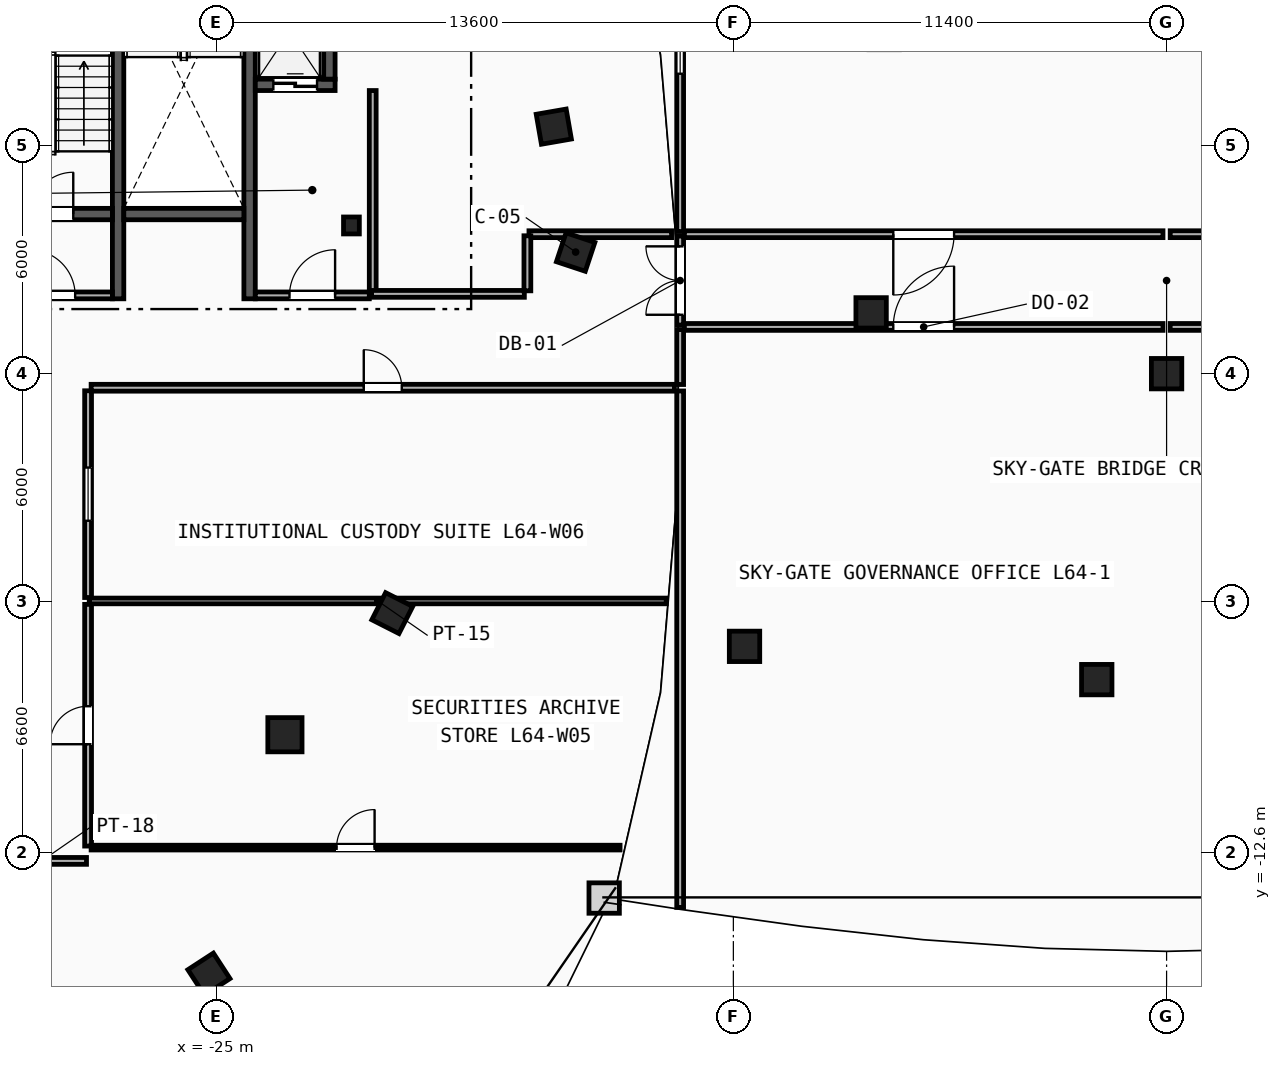
"""IFC4 building model, lengths in metres.
Left out: names, types, materials, properties, quantities, classifications, styles, units other than length and angle.
Written with IfcOpenShell. Run it as: python <this file> out.ifc"""

import sys

from ifc_helpers import new_model, si_unit, direction, frame, frame_2d, origin, origin_2d, place, context, subcontext, project, spatial, rectangle, i_section, extrude, element, fill, save


model = new_model("IFC4")
c1 = context("Model", 3, precision=1e-05, world=origin(), true_north=direction((0.0, 1.0)))
c2 = subcontext(c1, "Body", "Model", "MODEL_VIEW")
j1 = project(units=[si_unit("LENGTHUNIT", "METRE"), si_unit("PLANEANGLEUNIT", "RADIAN")], contexts=[c1])
p1 = place(None, origin())
s1 = spatial("IfcSite", under=j1, at=p1, CompositionType="ELEMENT")
p2 = place(p1, origin())
s2 = spatial("IfcBuilding", under=s1, at=p2, CompositionType="ELEMENT")
p3 = place(p2, frame((0.0, 0.0, 243.2)))
s3 = spatial("IfcBuildingStorey", under=s2, at=p3, CompositionType="ELEMENT", Elevation=243.2)
p4 = place(p3, frame((-21.45, 3.9, 0.0), z_axis=(0.0, 0.0, 1.0), x_axis=(1.0, 0.0, 0.0)))
e1 = element("IfcColumn", 1, at=p4, inside=s3, PredefinedType="COLUMN", context=c2, shape_type="SweptSolid", body=[
    extrude(i_section(OverallWidth=0.416, OverallDepth=0.446, WebThickness=0.039, FlangeThickness=0.063, FilletRadius=0.018, at=origin_2d()), origin(), (0.0, 0.0, 1.0), 3.6),
])
p5 = place(p3, frame((-23.2, -9.5, 0.0), z_axis=(0.0, 0.0, 1.0), x_axis=(1.0, 0.0, 0.0)))
e2 = element("IfcColumn", 2, at=p5, inside=s3, PredefinedType="COLUMN", context=c2, shape_type="SweptSolid", body=[
    extrude(rectangle(XDim=0.9, YDim=0.9, at=origin_2d()), origin(), (0.0, 0.0, 1.0), 3.6),
])
for number, where, z_axis, x_axis in (
    (3, (-15.55, 3.2, 0.0), (0.0, 0.0, 1.0), (0.315, 0.949, 0.0)),
    (4, (-16.125, 6.5, 0.0), (0.0, 0.0, 1.0), (-0.172, 0.985, 0.0)),
    (5, (-25.2, -15.8, 0.0), (0.0, 0.0, 1.0), (0.838, 0.546, 0.0)),
    (6, (-20.375, -6.3, 0.0), (0.0, 0.0, 1.0), (0.453, 0.892, 0.0)),
    (7, (-11.106, -7.175, 0.0), (0.0, 0.0, 1.0), (1.0, 0.0, 0.0)),
    (8, (-1.837, -8.05, 0.0), (0.0, 0.0, 1.0), (1.0, 0.0, 0.0)),
    (9, (-7.775, 1.6, 0.0), (0.0, 0.0, 1.0), (1.0, 0.0, 0.0)),
    (10, (0.0, 0.0, 0.0), (0.0, 0.0, 1.0), (1.0, 0.0, 0.0)),
):
    element("IfcColumn", number, at=place(p3, frame(where, z_axis=z_axis, x_axis=x_axis)), inside=s3, PredefinedType="COLUMN", context=c2, shape_type="SweptSolid", body=[
        extrude(rectangle(XDim=0.8, YDim=0.8, at=origin_2d()), origin(), (0.0, 0.0, 1.0), 3.6),
    ])
for number, where, z_axis, x_axis in (
    (11, (-27.59, 1.97, 0.0), (0.0, 0.0, 1.0), (0.0, 1.0, 0.0)),
    (12, (-24.13, 1.97, 0.0), (0.0, 0.0, 1.0), (0.0, 1.0, 0.0)),
):
    element("IfcWall", number, at=place(p3, frame(where, z_axis=z_axis, x_axis=x_axis)), inside=s3, PredefinedType="SHEAR", context=c2, shape_type="SweptSolid", body=[
        extrude(rectangle(XDim=10.68, YDim=0.3, at=frame_2d((5.34, 0.0))), origin(), (0.0, 0.0, 1.0), 3.34),
    ])
p6 = place(p3, frame((-30.9, 4.2, 0.0), z_axis=(0.0, 0.0, 1.0), x_axis=(1.0, 0.0, 0.0)))
e13 = element("IfcWall", 13, at=p6, inside=s3, PredefinedType="SHEAR", context=c2, shape_type="SweptSolid", body=[
    extrude(rectangle(XDim=3.16, YDim=0.3, at=frame_2d((1.58, 0.0))), origin(), (0.0, 0.0, 1.0), 3.34),
])
p7 = place(p6, frame((1.03, 0.0, 0.0)))
e14 = element("IfcOpeningElement", 14, at=p7, cuts=e13, PredefinedType="OPENING", context=c2, shape_type="SweptSolid", body=[
    extrude(rectangle(XDim=1.1, YDim=2.15, at=frame_2d((0.55, 1.075))), frame((0.0, 0.16, 0.0), z_axis=(0.0, -1.0, 0.0), x_axis=(1.0, 0.0, 0.0)), (0.0, 0.0, 1.0), 0.32),
])
p8 = place(p3, frame((-27.44, 4.2, 0.0), z_axis=(0.0, 0.0, 1.0), x_axis=(1.0, 0.0, 0.0)))
e15 = element("IfcWall", 15, at=p8, inside=s3, PredefinedType="SHEAR", context=c2, shape_type="SweptSolid", body=[
    extrude(rectangle(XDim=3.16, YDim=0.3, at=frame_2d((1.58, 0.0))), origin(), (0.0, 0.0, 1.0), 3.34),
])
p9 = place(p3, frame((-20.89, 2.15, 0.0), z_axis=(0.0, 0.0, 1.0), x_axis=(0.0, 1.0, 0.0)))
e16 = element("IfcWall", 16, at=p9, inside=s3, PredefinedType="PARTITIONING", context=c2, shape_type="SweptSolid", body=[
    extrude(rectangle(XDim=5.3, YDim=0.18, at=frame_2d((2.65, 0.0))), origin(), (0.0, 0.0, 1.0), 3.34),
])
p10 = place(p3, frame((-23.98, 2.06, 0.0), z_axis=(0.0, 0.0, 1.0), x_axis=(1.0, 0.0, 0.0)))
e17 = element("IfcWall", 17, at=p10, inside=s3, PredefinedType="PARTITIONING", context=c2, shape_type="SweptSolid", body=[
    extrude(rectangle(XDim=3.0, YDim=0.18, at=frame_2d((1.5, 0.0))), origin(), (0.0, 0.0, 1.0), 3.34),
])
p11 = place(p10, frame((0.9, 0.0, 0.0)))
e18 = element("IfcOpeningElement", 18, at=p11, cuts=e17, PredefinedType="OPENING", context=c2, shape_type="SweptSolid", body=[
    extrude(rectangle(XDim=1.2, YDim=2.15, at=frame_2d((0.6, 1.075))), frame((0.0, 0.1, 0.0), z_axis=(0.0, -1.0, 0.0), x_axis=(1.0, 0.0, 0.0)), (0.0, 0.0, 1.0), 0.2),
])
p12 = place(p3, frame((-30.9, 2.06, 0.0), z_axis=(0.0, 0.0, 1.0), x_axis=(1.0, 0.0, 0.0)))
e19 = element("IfcWall", 19, at=p12, inside=s3, PredefinedType="PARTITIONING", context=c2, shape_type="SweptSolid", body=[
    extrude(rectangle(XDim=3.16, YDim=0.18, at=frame_2d((1.58, 0.0))), origin(), (0.0, 0.0, 1.0), 3.34),
])
p13 = place(p12, frame((0.98, 0.0, 0.0)))
e20 = element("IfcOpeningElement", 20, at=p13, cuts=e19, PredefinedType="OPENING", context=c2, shape_type="SweptSolid", body=[
    extrude(rectangle(XDim=1.2, YDim=2.15, at=frame_2d((0.6, 1.075))), frame((0.0, 0.1, 0.0), z_axis=(0.0, -1.0, 0.0), x_axis=(1.0, 0.0, 0.0)), (0.0, 0.0, 1.0), 0.2),
])
p14 = place(p3, frame((-23.98, 7.6, 0.0), z_axis=(0.0, 0.0, 1.0), x_axis=(1.0, 0.0, 0.0)))
e21 = element("IfcWall", 21, at=p14, inside=s3, PredefinedType="SHEAR", context=c2, shape_type="SweptSolid", body=[
    extrude(rectangle(XDim=2.1, YDim=0.3, at=frame_2d((1.05, 0.0))), origin(), (0.0, 0.0, 1.0), 3.34),
])
p15 = place(p14, frame((0.475, 0.0, 0.0)))
e22 = element("IfcOpeningElement", 22, at=p15, cuts=e21, PredefinedType="OPENING", context=c2, shape_type="SweptSolid", body=[
    extrude(rectangle(XDim=1.15, YDim=2.2, at=frame_2d((0.575, 1.1))), frame((0.0, 0.16, 0.0), z_axis=(0.0, -1.0, 0.0), x_axis=(1.0, 0.0, 0.0)), (0.0, 0.0, 1.0), 0.32),
])
p16 = place(p3, frame((-22.03, 7.75, 0.0), z_axis=(0.0, 0.0, 1.0), x_axis=(0.0, 1.0, 0.0)))
e23 = element("IfcWall", 23, at=p16, inside=s3, PredefinedType="SHEAR", context=c2, shape_type="SweptSolid", body=[
    extrude(rectangle(XDim=2.5, YDim=0.3, at=frame_2d((1.25, 0.0))), origin(), (0.0, 0.0, 1.0), 3.34),
])
p17 = place(p3, frame((-28.35, -5.98, 0.0), z_axis=(0.0, 0.0, 1.0), x_axis=(1.0, 0.0, 0.0)))
e24 = element("IfcWall", 24, at=p17, inside=s3, PredefinedType="PARTITIONING", context=c2, shape_type="SweptSolid", body=[
    extrude(rectangle(XDim=15.185, YDim=0.15, at=frame_2d((7.593, 0.0))), origin(), (0.0, 0.0, 1.0), 3.34),
])
p18 = place(p3, frame((-30.779, -12.82, 0.0), z_axis=(0.0, 0.0, 1.0), x_axis=(1.0, 0.0, 0.0)))
e25 = element("IfcWall", 25, at=p18, inside=s3, PredefinedType="PARTITIONING", context=c2, shape_type="SweptSolid", body=[
    extrude(rectangle(XDim=2.357, YDim=0.18, at=frame_2d((1.179, 0.0))), origin(), (0.0, 0.0, 1.0), 3.34),
])
p19 = place(p3, frame((-28.38, -12.43, 0.0), z_axis=(0.0, 0.0, 1.0), x_axis=(0.0, 1.0, 0.0)))
e26 = element("IfcWall", 26, at=p19, inside=s3, PredefinedType="PARTITIONING", context=c2, shape_type="SweptSolid", body=[
    extrude(rectangle(XDim=6.36, YDim=0.18, at=frame_2d((3.18, 0.0))), origin(), (0.0, 0.0, 1.0), 3.34),
])
p20 = place(p19, frame((2.68, 0.0, 0.0)))
e27 = element("IfcOpeningElement", 27, at=p20, cuts=e26, PredefinedType="OPENING", context=c2, shape_type="SweptSolid", body=[
    extrude(rectangle(XDim=1.0, YDim=2.15, at=frame_2d((0.5, 1.075))), frame((0.0, 0.1, 0.0), z_axis=(0.0, -1.0, 0.0), x_axis=(1.0, 0.0, 0.0)), (0.0, 0.0, 1.0), 0.2),
])
p21 = place(p3, frame((-28.3, -0.37, 0.0), z_axis=(0.0, 0.0, 1.0), x_axis=(1.0, 0.0, 0.0)))
e28 = element("IfcWall", 28, at=p21, inside=s3, PredefinedType="PARTITIONING", context=c2, shape_type="SweptSolid", body=[
    extrude(rectangle(XDim=15.349, YDim=0.18, at=frame_2d((7.675, 0.0))), origin(), (0.0, 0.0, 1.0), 3.34),
])
p22 = place(p21, frame((7.175, 0.0, 0.0)))
e29 = element("IfcOpeningElement", 29, at=p22, cuts=e28, PredefinedType="OPENING", context=c2, shape_type="SweptSolid", body=[
    extrude(rectangle(XDim=1.0, YDim=2.15, at=frame_2d((0.5, 1.075))), frame((0.0, 0.1, 0.0), z_axis=(0.0, -1.0, 0.0), x_axis=(1.0, 0.0, 0.0)), (0.0, 0.0, 1.0), 0.2),
])
p23 = place(p3, frame((-28.38, -5.89, 0.0), z_axis=(0.0, 0.0, 1.0), x_axis=(0.0, 1.0, 0.0)))
e30 = element("IfcWall", 30, at=p23, inside=s3, PredefinedType="PARTITIONING", context=c2, shape_type="SweptSolid", body=[
    extrude(rectangle(XDim=5.44, YDim=0.18, at=frame_2d((2.72, 0.0))), origin(), (0.0, 0.0, 1.0), 3.34),
])
p24 = place(p23, frame((2.02, 0.0, 1.05)))
e31 = element("IfcOpeningElement", 31, at=p24, cuts=e30, PredefinedType="OPENING", context=c2, shape_type="SweptSolid", body=[
    extrude(rectangle(XDim=1.4, YDim=1.5, at=frame_2d((0.7, 0.75))), frame((0.0, 0.1, 0.0), z_axis=(0.0, -1.0, 0.0), x_axis=(1.0, 0.0, 0.0)), (0.0, 0.0, 1.0), 0.2),
])
p25 = place(p3, frame((-16.9, 2.1, 0.0), z_axis=(0.0, 0.0, 1.0), x_axis=(-1.0, 0.0, 0.0)))
e32 = element("IfcWall", 32, at=p25, inside=s3, PredefinedType="PARTITIONING", context=c2, shape_type="SweptSolid", body=[
    extrude(rectangle(XDim=4.02, YDim=0.18, at=frame_2d((2.01, 0.0))), origin(), (0.0, 0.0, 1.0), 3.34),
])
p26 = place(p3, frame((-13.026, 3.67, 0.0), z_axis=(0.0, 0.0, 1.0), x_axis=(-1.0, 0.0, 0.0)))
e33 = element("IfcWall", 33, at=p26, inside=s3, PredefinedType="PARTITIONING", context=c2, shape_type="SweptSolid", body=[
    extrude(rectangle(XDim=3.753, YDim=0.18, at=frame_2d((1.876, 0.0))), origin(), (0.0, 0.0, 1.0), 3.34),
])
p27 = place(p3, frame((-16.82, 3.628, 0.0), z_axis=(0.0, 0.0, 1.0), x_axis=(0.0, -1.0, 0.0)))
e34 = element("IfcWall", 34, at=p27, inside=s3, PredefinedType="PARTITIONING", context=c2, shape_type="SweptSolid", body=[
    extrude(rectangle(XDim=1.448, YDim=0.18, at=frame_2d((0.724, 0.0))), origin(), (0.0, 0.0, 1.0), 3.34),
])
p28 = place(p3, frame((-28.3, -12.47, 0.0), z_axis=(0.0, 0.0, 1.0), x_axis=(1.0, 0.0, 0.0)))
e35 = element("IfcWall", 35, at=p28, inside=s3, PredefinedType="PARTITIONING", context=c2, shape_type="SweptSolid", body=[
    extrude(rectangle(XDim=13.919, YDim=0.125, at=frame_2d((6.959, 0.0))), origin(), (0.0, 0.0, 1.0), 3.34),
])
p29 = place(p28, frame((6.459, 0.0, 0.0)))
e36 = element("IfcOpeningElement", 36, at=p29, cuts=e35, PredefinedType="OPENING", context=c2, shape_type="SweptSolid", body=[
    extrude(rectangle(XDim=1.0, YDim=2.15, at=frame_2d((0.5, 1.075))), frame((0.0, 0.073, 0.0), z_axis=(0.0, -1.0, 0.0), x_axis=(1.0, 0.0, 0.0)), (0.0, 0.0, 1.0), 0.145),
])
p30 = place(p3, frame((-12.688, 1.23, 0.0), z_axis=(0.0, 0.0, 1.0), x_axis=(1.0, 0.0, 0.0)))
e37 = element("IfcWall", 37, at=p30, inside=s3, PredefinedType="PARTITIONING", context=c2, shape_type="SweptSolid", body=[
    extrude(rectangle(XDim=12.594, YDim=0.18, at=frame_2d((6.297, 0.0))), origin(), (0.0, 0.0, 1.0), 2.663),
])
p31 = place(p30, frame((5.497, 0.0, 0.0)))
e38 = element("IfcOpeningElement", 38, at=p31, cuts=e37, PredefinedType="OPENING", context=c2, shape_type="SweptSolid", body=[
    extrude(rectangle(XDim=1.6, YDim=2.2, at=frame_2d((0.8, 1.1))), frame((0.0, 0.1, 0.0), z_axis=(0.0, -1.0, 0.0), x_axis=(1.0, 0.0, 0.0)), (0.0, 0.0, 1.0), 0.2),
])
p32 = place(p3, frame((0.095, 1.23, 0.0), z_axis=(0.0, 0.0, 1.0), x_axis=(1.0, 0.0, 0.0)))
e39 = element("IfcWall", 39, at=p32, inside=s3, PredefinedType="PARTITIONING", context=c2, shape_type="SweptSolid", body=[
    extrude(rectangle(XDim=12.594, YDim=0.18, at=frame_2d((6.297, 0.0))), origin(), (0.0, 0.0, 1.0), 3.34),
])
p33 = place(p32, frame((5.497, 0.0, 0.0)))
e40 = element("IfcOpeningElement", 40, at=p33, cuts=e39, PredefinedType="OPENING", context=c2, shape_type="SweptSolid", body=[
    extrude(rectangle(XDim=1.6, YDim=2.2, at=frame_2d((0.8, 1.1))), frame((0.0, 0.1, 0.0), z_axis=(0.0, -1.0, 0.0), x_axis=(1.0, 0.0, 0.0)), (0.0, 0.0, 1.0), 0.2),
])
p34 = place(p3, frame((-0.095, 3.67, 0.0), z_axis=(0.0, 0.0, 1.0), x_axis=(-1.0, 0.0, 0.0)))
e41 = element("IfcWall", 41, at=p34, inside=s3, PredefinedType="PARTITIONING", context=c2, shape_type="SweptSolid", body=[
    extrude(rectangle(XDim=12.594, YDim=0.18, at=frame_2d((6.297, 0.0))), origin(), (0.0, 0.0, 1.0), 3.34),
])
p35 = place(p34, frame((5.497, 0.0, 0.0)))
e42 = element("IfcOpeningElement", 42, at=p35, cuts=e41, PredefinedType="OPENING", context=c2, shape_type="SweptSolid", body=[
    extrude(rectangle(XDim=1.6, YDim=2.2, at=frame_2d((0.8, 1.1))), frame((0.0, 0.1, 0.0), z_axis=(0.0, -1.0, 0.0), x_axis=(1.0, 0.0, 0.0)), (0.0, 0.0, 1.0), 0.2),
])
p36 = place(p3, frame((12.688, 3.67, 0.0), z_axis=(0.0, 0.0, 1.0), x_axis=(-1.0, 0.0, 0.0)))
e43 = element("IfcWall", 43, at=p36, inside=s3, PredefinedType="PARTITIONING", context=c2, shape_type="SweptSolid", body=[
    extrude(rectangle(XDim=12.594, YDim=0.18, at=frame_2d((6.297, 0.0))), origin(), (0.0, 0.0, 1.0), 3.34),
])
p37 = place(p36, frame((5.497, 0.0, 0.0)))
e44 = element("IfcOpeningElement", 44, at=p37, cuts=e43, PredefinedType="OPENING", context=c2, shape_type="SweptSolid", body=[
    extrude(rectangle(XDim=1.6, YDim=2.2, at=frame_2d((0.8, 1.1))), frame((0.0, 0.1, 0.0), z_axis=(0.0, -1.0, 0.0), x_axis=(1.0, 0.0, 0.0)), (0.0, 0.0, 1.0), 0.2),
])
p38 = place(p3, frame((-12.8, -14.044, 0.0), z_axis=(0.0, 0.0, 1.0), x_axis=(0.0, 1.0, 0.0)))
e45 = element("IfcWall", 45, at=p38, inside=s3, PredefinedType="PARTITIONING", context=c2, shape_type="SweptSolid", body=[
    extrude(rectangle(XDim=13.589, YDim=0.18, at=frame_2d((6.794, 0.0))), origin(), (0.0, 0.0, 1.0), 3.34),
])
p39 = place(p3, frame((-12.8, -0.285, 0.0), z_axis=(0.0, 0.0, 1.0), x_axis=(0.0, 1.0, 0.0)))
e46 = element("IfcWall", 46, at=p39, inside=s3, PredefinedType="PARTITIONING", context=c2, shape_type="SweptSolid", body=[
    extrude(rectangle(XDim=1.445, YDim=0.18, at=frame_2d((0.722, 0.0))), origin(), (0.0, 0.0, 1.0), 3.34),
])
p40 = place(p3, frame((-12.8, 3.74, 0.0), z_axis=(0.0, 0.0, 1.0), x_axis=(0.0, 1.0, 0.0)))
e47 = element("IfcWall", 47, at=p40, inside=s3, PredefinedType="PARTITIONING", context=c2, shape_type="SweptSolid", body=[
    extrude(rectangle(XDim=10.304, YDim=0.18, at=frame_2d((5.152, 0.0))), origin(), (0.0, 0.0, 1.0), 3.34),
])
p41 = place(p40, frame((4.152, 0.0, 1.05)))
e48 = element("IfcOpeningElement", 48, at=p41, cuts=e47, PredefinedType="OPENING", context=c2, shape_type="SweptSolid", body=[
    extrude(rectangle(XDim=2.0, YDim=1.5, at=frame_2d((1.0, 0.75))), frame((0.0, 0.1, 0.0), z_axis=(0.0, -1.0, 0.0), x_axis=(1.0, 0.0, 0.0)), (0.0, 0.0, 1.0), 0.2),
])
p42 = place(p3, frame((-12.8, 1.28, 0.0), z_axis=(0.0, 0.0, 1.0), x_axis=(0.0, 1.0, 0.0)))
e49 = element("IfcWall", 49, at=p42, inside=s3, PredefinedType="PARTITIONING", context=c2, shape_type="SweptSolid", body=[
    extrude(rectangle(XDim=2.34, YDim=0.18, at=frame_2d((1.17, 0.0))), origin(), (0.0, 0.0, 1.0), 3.34),
])
p43 = place(p42, frame((0.27, 0.0, 0.0)))
e50 = element("IfcOpeningElement", 50, at=p43, cuts=e49, PredefinedType="OPENING", context=c2, shape_type="SweptSolid", body=[
    extrude(rectangle(XDim=1.8, YDim=2.25, at=frame_2d((0.9, 1.125))), frame((0.0, 0.1, 0.0), z_axis=(0.0, -1.0, 0.0), x_axis=(1.0, 0.0, 0.0)), (0.0, 0.0, 1.0), 0.2),
])
p44 = place(p7, origin())
e51 = element("IfcDoor", 51, at=p44, inside=s3, OperationType="SINGLE_SWING_RIGHT", PredefinedType="DOOR", context=c2, shape_type="SweptSolid", body=[
    extrude(rectangle(XDim=1.1, YDim=2.15, at=frame_2d((0.55, 1.075))), frame((0.0, 0.025, 0.0), z_axis=(0.0, -1.0, 0.0), x_axis=(1.0, 0.0, 0.0)), (0.0, 0.0, 1.0), 0.05),
])
fill(e14, e51)
p45 = place(p11, origin())
e52 = element("IfcDoor", 52, at=p45, inside=s3, OperationType="SINGLE_SWING_RIGHT", PredefinedType="DOOR", context=c2, shape_type="SweptSolid", body=[
    extrude(rectangle(XDim=1.2, YDim=2.15, at=frame_2d((0.6, 1.075))), frame((0.0, 0.025, 0.0), z_axis=(0.0, -1.0, 0.0), x_axis=(1.0, 0.0, 0.0)), (0.0, 0.0, 1.0), 0.05),
])
fill(e18, e52)
p46 = place(p13, origin())
e53 = element("IfcDoor", 53, at=p46, inside=s3, OperationType="SINGLE_SWING_LEFT", PredefinedType="DOOR", context=c2, shape_type="SweptSolid", body=[
    extrude(rectangle(XDim=1.2, YDim=2.15, at=frame_2d((0.6, 1.075))), frame((0.0, 0.025, 0.0), z_axis=(0.0, -1.0, 0.0), x_axis=(1.0, 0.0, 0.0)), (0.0, 0.0, 1.0), 0.05),
])
fill(e20, e53)
p47 = place(p15, origin())
e54 = element("IfcDoor", 54, at=p47, inside=s3, OperationType="SLIDING_TO_LEFT", PredefinedType="TRAPDOOR", context=c2, shape_type="SweptSolid", body=[
    extrude(rectangle(XDim=1.15, YDim=2.2, at=frame_2d((0.575, 1.1))), frame((0.0, 0.025, 0.0), z_axis=(0.0, -1.0, 0.0), x_axis=(1.0, 0.0, 0.0)), (0.0, 0.0, 1.0), 0.05),
])
fill(e22, e54)
p48 = place(p22, origin())
e55 = element("IfcDoor", 55, at=p48, inside=s3, OperationType="SINGLE_SWING_LEFT", PredefinedType="DOOR", context=c2, shape_type="SweptSolid", body=[
    extrude(rectangle(XDim=1.0, YDim=2.15, at=frame_2d((0.5, 1.075))), frame((0.0, 0.025, 0.0), z_axis=(0.0, -1.0, 0.0), x_axis=(1.0, 0.0, 0.0)), (0.0, 0.0, 1.0), 0.05),
])
fill(e29, e55)
p49 = place(p29, origin())
e56 = element("IfcDoor", 56, at=p49, inside=s3, OperationType="SINGLE_SWING_RIGHT", PredefinedType="DOOR", context=c2, shape_type="SweptSolid", body=[
    extrude(rectangle(XDim=1.0, YDim=2.15, at=frame_2d((0.5, 1.075))), frame((0.0, 0.025, 0.0), z_axis=(0.0, -1.0, 0.0), x_axis=(1.0, 0.0, 0.0)), (0.0, 0.0, 1.0), 0.05),
])
fill(e36, e56)
p50 = place(p31, origin())
e57 = element("IfcDoor", 57, at=p50, inside=s3, OperationType="SINGLE_SWING_RIGHT", PredefinedType="DOOR", context=c2, shape_type="SweptSolid", body=[
    extrude(rectangle(XDim=1.6, YDim=2.2, at=frame_2d((0.8, 1.1))), frame((0.0, 0.025, 0.0), z_axis=(0.0, -1.0, 0.0), x_axis=(1.0, 0.0, 0.0)), (0.0, 0.0, 1.0), 0.05),
])
fill(e38, e57)
p51 = place(p35, origin())
e58 = element("IfcDoor", 58, at=p51, inside=s3, OperationType="SINGLE_SWING_RIGHT", PredefinedType="DOOR", context=c2, shape_type="SweptSolid", body=[
    extrude(rectangle(XDim=1.6, YDim=2.2, at=frame_2d((0.8, 1.1))), frame((0.0, 0.025, 0.0), z_axis=(0.0, -1.0, 0.0), x_axis=(1.0, 0.0, 0.0)), (0.0, 0.0, 1.0), 0.05),
])
fill(e42, e58)
p52 = place(p20, origin())
e59 = element("IfcDoor", 59, at=p52, inside=s3, OperationType="SINGLE_SWING_LEFT", PredefinedType="DOOR", context=c2, shape_type="SweptSolid", body=[
    extrude(rectangle(XDim=1.0, YDim=2.15, at=frame_2d((0.5, 1.075))), frame((0.0, 0.025, 0.0), z_axis=(0.0, -1.0, 0.0), x_axis=(1.0, 0.0, 0.0)), (0.0, 0.0, 1.0), 0.05),
])
fill(e27, e59)
p53 = place(p43, origin())
e60 = element("IfcDoor", 60, at=p53, inside=s3, OperationType="DOUBLE_DOOR_SINGLE_SWING", PredefinedType="DOOR", context=c2, shape_type="SweptSolid", body=[
    extrude(rectangle(XDim=1.8, YDim=2.25, at=frame_2d((0.9, 1.125))), frame((0.0, 0.025, 0.0), z_axis=(0.0, -1.0, 0.0), x_axis=(1.0, 0.0, 0.0)), (0.0, 0.0, 1.0), 0.05),
])
fill(e50, e60)
p54 = place(p24, origin())
e61 = element("IfcWindow", 61, at=p54, inside=s3, PartitioningType="SINGLE_PANEL", PredefinedType="WINDOW", context=c2, shape_type="SweptSolid", body=[
    extrude(rectangle(XDim=1.4, YDim=1.5, at=frame_2d((0.7, 0.75))), frame((0.0, 0.03, 0.0), z_axis=(0.0, -1.0, 0.0), x_axis=(1.0, 0.0, 0.0)), (0.0, 0.0, 1.0), 0.06),
])
fill(e31, e61)
p55 = place(p41, origin())
e62 = element("IfcWindow", 62, at=p55, inside=s3, PartitioningType="SINGLE_PANEL", PredefinedType="WINDOW", context=c2, shape_type="SweptSolid", body=[
    extrude(rectangle(XDim=2.0, YDim=1.5, at=frame_2d((1.0, 0.75))), frame((0.0, 0.03, 0.0), z_axis=(0.0, -1.0, 0.0), x_axis=(1.0, 0.0, 0.0)), (0.0, 0.0, 1.0), 0.06),
])
fill(e48, e62)
save(model, sys.argv[1])
